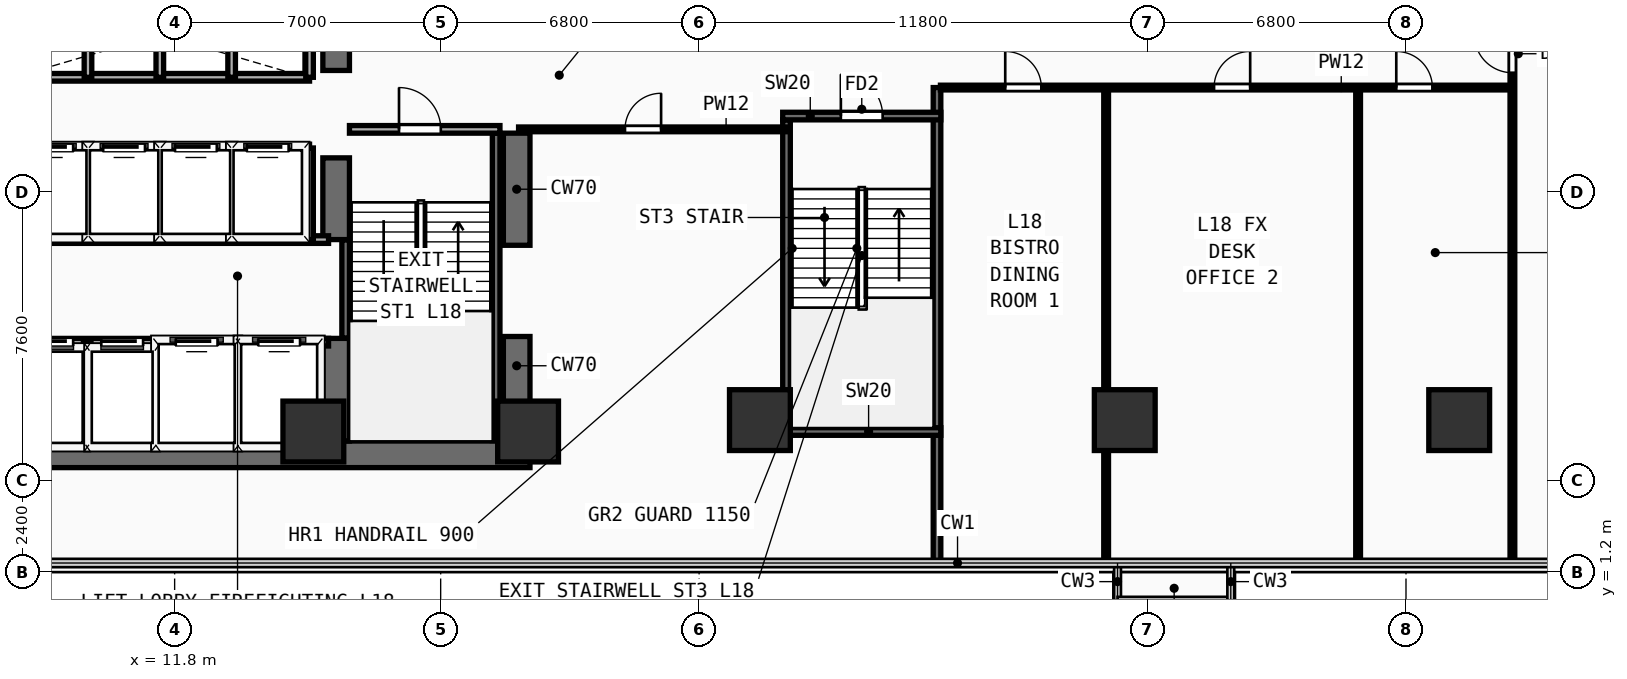
"""IFC4 building model, lengths in metres.
Left out: names, types, materials, properties, quantities, classifications, styles, units other than length and angle.
Written with IfcOpenShell. Run it as: python <this file> out.ifc"""

import sys

from ifc_helpers import new_model, si_unit, direction, frame, frame_2d, origin, origin_2d, place, context, subcontext, project, spatial, rectangle, extrude, element, fill, save


model = new_model("IFC4")
c1 = context("Model", 3, precision=1e-05, world=origin(), true_north=direction((0.0, 1.0)))
c2 = subcontext(c1, "Body", "Model", "MODEL_VIEW")
j1 = project(units=[si_unit("LENGTHUNIT", "METRE"), si_unit("PLANEANGLEUNIT", "RADIAN")], contexts=[c1])
p1 = place(None, origin())
s1 = spatial("IfcSite", under=j1, at=p1, CompositionType="ELEMENT")
p2 = place(p1, origin())
s2 = spatial("IfcBuilding", under=s1, at=p2, CompositionType="ELEMENT")
p3 = place(p2, frame((0.0, 0.0, 71.4)))
s3 = spatial("IfcBuildingStorey", under=s2, at=p3, CompositionType="ELEMENT", Elevation=71.4)
p4 = place(p3, frame((7.1, 4.3, 0.0), z_axis=(0.0, 0.0, 1.0), x_axis=(1.0, 0.0, 0.0)))
e1 = element("IfcWall", 1, at=p4, inside=s3, PredefinedType="SHEAR", context=c2, shape_type="SweptSolid", body=[
    extrude(rectangle(XDim=14.05, YDim=0.7, at=frame_2d((7.025, 0.0))), origin(), (0.0, 0.0, 1.0), 3.54),
])
p5 = place(p3, frame((20.8, 4.65, 0.0), z_axis=(0.0, 0.0, 1.0), x_axis=(0.0, 1.0, 0.0)))
e2 = element("IfcWall", 2, at=p5, inside=s3, PredefinedType="SHEAR", context=c2, shape_type="SweptSolid", body=[
    extrude(rectangle(XDim=2.75, YDim=0.7, at=frame_2d((1.375, 0.0))), origin(), (0.0, 0.0, 1.0), 3.54),
])
p6 = place(p3, frame((20.8, 9.8, 0.0), z_axis=(0.0, 0.0, 1.0), x_axis=(0.0, 1.0, 0.0)))
e3 = element("IfcWall", 3, at=p6, inside=s3, PredefinedType="SHEAR", context=c2, shape_type="SweptSolid", body=[
    extrude(rectangle(XDim=2.95, YDim=0.7, at=frame_2d((1.475, 0.0))), origin(), (0.0, 0.0, 1.0), 3.54),
])
p7 = place(p3, frame((16.05, 4.65, 0.0), z_axis=(0.0, 0.0, 1.0), x_axis=(0.0, 1.0, 0.0)))
e4 = element("IfcWall", 4, at=p7, inside=s3, PredefinedType="SHEAR", context=c2, shape_type="SweptSolid", body=[
    extrude(rectangle(XDim=2.7, YDim=0.7, at=frame_2d((1.35, 0.0))), origin(), (0.0, 0.0, 1.0), 3.54),
])
p8 = place(p3, frame((16.05, 9.95, 0.0), z_axis=(0.0, 0.0, 1.0), x_axis=(0.0, 1.0, 0.0)))
e5 = element("IfcWall", 5, at=p8, inside=s3, PredefinedType="SHEAR", context=c2, shape_type="SweptSolid", body=[
    extrude(rectangle(XDim=2.15, YDim=0.7, at=frame_2d((1.075, 0.0))), origin(), (0.0, 0.0, 1.0), 3.54),
])
p9 = place(p3, frame((16.05, 14.4, 0.0), z_axis=(0.0, 0.0, 1.0), x_axis=(0.0, 1.0, 0.0)))
e6 = element("IfcWall", 6, at=p9, inside=s3, PredefinedType="SHEAR", context=c2, shape_type="SweptSolid", body=[
    extrude(rectangle(XDim=9.1, YDim=0.7, at=frame_2d((4.55, 0.0))), origin(), (0.0, 0.0, 1.0), 3.54),
])
for number, where, z_axis, x_axis in (
    (7, (15.45, 4.9, 0.0), (0.0, 0.0, 1.0), (1.0, 0.0, 0.0)),
    (8, (21.1, 4.9, 0.0), (0.0, 0.0, 1.0), (1.0, 0.0, 0.0)),
    (9, (27.2, 5.2, 0.0), (0.0, 0.0, 1.0), (1.0, 0.0, 0.0)),
    (10, (36.8, 5.2, 0.0), (0.0, 0.0, 1.0), (1.0, 0.0, 0.0)),
    (11, (45.6, 5.2, 0.0), (0.0, 0.0, 1.0), (1.0, 0.0, 0.0)),
):
    element("IfcColumn", number, at=place(p3, frame(where, z_axis=z_axis, x_axis=x_axis)), inside=s3, PredefinedType="COLUMN", context=c2, shape_type="SweptSolid", body=[
        extrude(rectangle(XDim=1.6, YDim=1.6, at=origin_2d()), origin(), (0.0, 0.0, 1.0), 3.54),
    ])
p10 = place(p3, frame((16.3, 7.36, 0.0), z_axis=(0.0, 0.0, 1.0), x_axis=(0.0, 1.0, 0.0)))
e12 = element("IfcWall", 12, at=p10, inside=s3, PredefinedType="SHEAR", context=c2, shape_type="SweptSolid", body=[
    extrude(rectangle(XDim=2.58, YDim=0.2, at=frame_2d((1.29, 0.0))), origin(), (0.0, 0.0, 1.0), 3.54),
])
p11 = place(p3, frame((20.26, 4.66, 0.0), z_axis=(0.0, 0.0, 1.0), x_axis=(0.0, 1.0, 0.0)))
e13 = element("IfcWall", 13, at=p11, inside=s3, PredefinedType="SHEAR", context=c2, shape_type="SweptSolid", body=[
    extrude(rectangle(XDim=8.09, YDim=0.2, at=frame_2d((4.045, 0.0))), origin(), (0.0, 0.0, 1.0), 3.54),
])
p12 = place(p3, frame((16.4, 12.85, 0.0), z_axis=(0.0, 0.0, 1.0), x_axis=(1.0, 0.0, 0.0)))
e14 = element("IfcWall", 14, at=p12, inside=s3, PredefinedType="PARTITIONING", context=c2, shape_type="SweptSolid", body=[
    extrude(rectangle(XDim=3.96, YDim=0.2, at=frame_2d((1.98, 0.0))), origin(), (0.0, 0.0, 1.0), 3.54),
])
p13 = place(p12, frame((1.304, 0.0, 0.0)))
e15 = element("IfcOpeningElement", 15, at=p13, cuts=e14, PredefinedType="OPENING", context=c2, shape_type="SweptSolid", body=[
    extrude(rectangle(XDim=1.1, YDim=2.2, at=frame_2d((0.55, 1.1))), frame((0.0, 0.11, 0.0), z_axis=(0.0, -1.0, 0.0), x_axis=(1.0, 0.0, 0.0)), (0.0, 0.0, 1.0), 0.22),
])
p14 = place(p3, frame((27.9, 5.0, 0.0), z_axis=(0.0, 0.0, 1.0), x_axis=(0.0, 1.0, 0.0)))
e16 = element("IfcWall", 16, at=p14, inside=s3, PredefinedType="SHEAR", context=c2, shape_type="SweptSolid", body=[
    extrude(rectangle(XDim=8.1, YDim=0.2, at=frame_2d((4.05, 0.0))), origin(), (0.0, 0.0, 1.0), 3.54),
])
p15 = place(p3, frame((31.86, 1.44, 0.0), z_axis=(0.0, 0.0, 1.0), x_axis=(0.0, 1.0, 0.0)))
e17 = element("IfcWall", 17, at=p15, inside=s3, PredefinedType="SHEAR", context=c2, shape_type="SweptSolid", body=[
    extrude(rectangle(XDim=12.51, YDim=0.2, at=frame_2d((6.255, 0.0))), origin(), (0.0, 0.0, 1.0), 3.54),
])
p16 = place(p3, frame((27.8, 4.9, 0.0), z_axis=(0.0, 0.0, 1.0), x_axis=(1.0, 0.0, 0.0)))
e18 = element("IfcWall", 18, at=p16, inside=s3, PredefinedType="SHEAR", context=c2, shape_type="SweptSolid", body=[
    extrude(rectangle(XDim=4.16, YDim=0.2, at=frame_2d((2.08, 0.0))), origin(), (0.0, 0.0, 1.0), 3.54),
])
p17 = place(p3, frame((27.8, 13.2, 0.0), z_axis=(0.0, 0.0, 1.0), x_axis=(1.0, 0.0, 0.0)))
e19 = element("IfcWall", 19, at=p17, inside=s3, PredefinedType="SHEAR", context=c2, shape_type="SweptSolid", body=[
    extrude(rectangle(XDim=4.16, YDim=0.2, at=frame_2d((2.08, 0.0))), origin(), (0.0, 0.0, 1.0), 3.54),
])
p18 = place(p17, frame((1.53, 0.0, 0.0)))
e20 = element("IfcOpeningElement", 20, at=p18, cuts=e19, PredefinedType="OPENING", context=c2, shape_type="SweptSolid", body=[
    extrude(rectangle(XDim=1.1, YDim=2.2, at=frame_2d((0.55, 1.1))), frame((0.0, 0.11, 0.0), z_axis=(0.0, -1.0, 0.0), x_axis=(1.0, 0.0, 0.0)), (0.0, 0.0, 1.0), 0.22),
])
p19 = place(p3, frame((7.5, 7.25, 0.0), z_axis=(0.0, 0.0, 1.0), x_axis=(1.0, 0.0, 0.0)))
e21 = element("IfcWall", 21, at=p19, inside=s3, PredefinedType="PARTITIONING", context=c2, shape_type="SweptSolid", body=[
    extrude(rectangle(XDim=8.35, YDim=0.2, at=frame_2d((4.175, 0.0))), origin(), (0.0, 0.0, 1.0), 3.54),
])
p20 = place(p19, frame((0.53, 0.0, 0.0)))
e22 = element("IfcOpeningElement", 22, at=p20, cuts=e21, PredefinedType="OPENING", context=c2, shape_type="SweptSolid", body=[
    extrude(rectangle(XDim=1.1, YDim=2.2, at=frame_2d((0.55, 1.1))), frame((0.0, 0.11, 0.0), z_axis=(0.0, -1.0, 0.0), x_axis=(1.0, 0.0, 0.0)), (0.0, 0.0, 1.0), 0.22),
])
p21 = place(p19, frame((2.37, 0.0, 0.0)))
e23 = element("IfcOpeningElement", 23, at=p21, cuts=e21, PredefinedType="OPENING", context=c2, shape_type="SweptSolid", body=[
    extrude(rectangle(XDim=1.1, YDim=2.2, at=frame_2d((0.55, 1.1))), frame((0.0, 0.11, 0.0), z_axis=(0.0, -1.0, 0.0), x_axis=(1.0, 0.0, 0.0)), (0.0, 0.0, 1.0), 0.22),
])
p22 = place(p19, frame((4.33, 0.0, 0.0)))
e24 = element("IfcOpeningElement", 24, at=p22, cuts=e21, PredefinedType="OPENING", context=c2, shape_type="SweptSolid", body=[
    extrude(rectangle(XDim=1.1, YDim=2.2, at=frame_2d((0.55, 1.1))), frame((0.0, 0.11, 0.0), z_axis=(0.0, -1.0, 0.0), x_axis=(1.0, 0.0, 0.0)), (0.0, 0.0, 1.0), 0.22),
])
p23 = place(p19, frame((6.5, 0.0, 0.0)))
e25 = element("IfcOpeningElement", 25, at=p23, cuts=e21, PredefinedType="OPENING", context=c2, shape_type="SweptSolid", body=[
    extrude(rectangle(XDim=1.1, YDim=2.2, at=frame_2d((0.55, 1.1))), frame((0.0, 0.11, 0.0), z_axis=(0.0, -1.0, 0.0), x_axis=(1.0, 0.0, 0.0)), (0.0, 0.0, 1.0), 0.22),
])
p24 = place(p3, frame((7.5, 9.95, 0.0), z_axis=(0.0, 0.0, 1.0), x_axis=(1.0, 0.0, 0.0)))
e26 = element("IfcWall", 26, at=p24, inside=s3, PredefinedType="PARTITIONING", context=c2, shape_type="SweptSolid", body=[
    extrude(rectangle(XDim=8.35, YDim=0.2, at=frame_2d((4.175, 0.0))), origin(), (0.0, 0.0, 1.0), 3.54),
])
for number, where, z_axis, x_axis in (
    (27, (9.5, 4.45, 0.0), (0.0, 0.0, 1.0), (0.0, 1.0, 0.0)),
    (28, (11.36, 4.45, 0.0), (0.0, 0.0, 1.0), (0.0, 1.0, 0.0)),
    (29, (13.46, 4.45, 0.0), (0.0, 0.0, 1.0), (0.0, 1.0, 0.0)),
):
    element("IfcWall", number, at=place(p3, frame(where, z_axis=z_axis, x_axis=x_axis)), inside=s3, PredefinedType="PARTITIONING", context=c2, shape_type="SweptSolid", body=[
        extrude(rectangle(XDim=2.8, YDim=0.2, at=frame_2d((1.4, 0.0))), origin(), (0.0, 0.0, 1.0), 3.54),
    ])
p25 = place(p3, frame((7.5, 12.36, 0.0), z_axis=(0.0, 0.0, 1.0), x_axis=(1.0, 0.0, 0.0)))
e30 = element("IfcWall", 30, at=p25, inside=s3, PredefinedType="PARTITIONING", context=c2, shape_type="SweptSolid", body=[
    extrude(rectangle(XDim=7.85, YDim=0.2, at=frame_2d((3.925, 0.0))), origin(), (0.0, 0.0, 1.0), 3.54),
])
p26 = place(p25, frame((0.53, 0.0, 0.0)))
e31 = element("IfcOpeningElement", 31, at=p26, cuts=e30, PredefinedType="OPENING", context=c2, shape_type="SweptSolid", body=[
    extrude(rectangle(XDim=1.1, YDim=2.2, at=frame_2d((0.55, 1.1))), frame((0.0, 0.11, 0.0), z_axis=(0.0, -1.0, 0.0), x_axis=(1.0, 0.0, 0.0)), (0.0, 0.0, 1.0), 0.22),
])
p27 = place(p25, frame((2.42, 0.0, 0.0)))
e32 = element("IfcOpeningElement", 32, at=p27, cuts=e30, PredefinedType="OPENING", context=c2, shape_type="SweptSolid", body=[
    extrude(rectangle(XDim=1.1, YDim=2.2, at=frame_2d((0.55, 1.1))), frame((0.0, 0.11, 0.0), z_axis=(0.0, -1.0, 0.0), x_axis=(1.0, 0.0, 0.0)), (0.0, 0.0, 1.0), 0.22),
])
p28 = place(p25, frame((4.31, 0.0, 0.0)))
e33 = element("IfcOpeningElement", 33, at=p28, cuts=e30, PredefinedType="OPENING", context=c2, shape_type="SweptSolid", body=[
    extrude(rectangle(XDim=1.1, YDim=2.2, at=frame_2d((0.55, 1.1))), frame((0.0, 0.11, 0.0), z_axis=(0.0, -1.0, 0.0), x_axis=(1.0, 0.0, 0.0)), (0.0, 0.0, 1.0), 0.22),
])
p29 = place(p25, frame((6.2, 0.0, 0.0)))
e34 = element("IfcOpeningElement", 34, at=p29, cuts=e30, PredefinedType="OPENING", context=c2, shape_type="SweptSolid", body=[
    extrude(rectangle(XDim=1.1, YDim=2.2, at=frame_2d((0.55, 1.1))), frame((0.0, 0.11, 0.0), z_axis=(0.0, -1.0, 0.0), x_axis=(1.0, 0.0, 0.0)), (0.0, 0.0, 1.0), 0.22),
])
for number, where, z_axis, x_axis in (
    (35, (15.35, 9.95, 0.0), (0.0, 0.0, 1.0), (0.0, 1.0, 0.0)),
    (36, (9.52, 9.95, 0.0), (0.0, 0.0, 1.0), (0.0, 1.0, 0.0)),
    (37, (11.41, 9.95, 0.0), (0.0, 0.0, 1.0), (0.0, 1.0, 0.0)),
    (38, (13.3, 9.95, 0.0), (0.0, 0.0, 1.0), (0.0, 1.0, 0.0)),
):
    element("IfcWall", number, at=place(p3, frame(where, z_axis=z_axis, x_axis=x_axis)), inside=s3, PredefinedType="PARTITIONING", context=c2, shape_type="SweptSolid", body=[
        extrude(rectangle(XDim=2.41, YDim=0.2, at=frame_2d((1.205, 0.0))), origin(), (0.0, 0.0, 1.0), 3.54),
    ])
p30 = place(p3, frame((7.5, 14.22, 0.0), z_axis=(0.0, 0.0, 1.0), x_axis=(1.0, 0.0, 0.0)))
e39 = element("IfcWall", 39, at=p30, inside=s3, PredefinedType="PARTITIONING", context=c2, shape_type="SweptSolid", body=[
    extrude(rectangle(XDim=7.85, YDim=0.2, at=frame_2d((3.925, 0.0))), origin(), (0.0, 0.0, 1.0), 3.54),
])
for number, where, z_axis, x_axis in (
    (40, (15.35, 14.22, 0.0), (0.0, 0.0, 1.0), (0.0, 1.0, 0.0)),
    (41, (9.52, 14.22, 0.0), (0.0, 0.0, 1.0), (0.0, 1.0, 0.0)),
    (42, (11.41, 14.22, 0.0), (0.0, 0.0, 1.0), (0.0, 1.0, 0.0)),
    (43, (13.3, 14.22, 0.0), (0.0, 0.0, 1.0), (0.0, 1.0, 0.0)),
):
    element("IfcWall", number, at=place(p3, frame(where, z_axis=z_axis, x_axis=x_axis)), inside=s3, PredefinedType="PARTITIONING", context=c2, shape_type="SweptSolid", body=[
        extrude(rectangle(XDim=2.23, YDim=0.2, at=frame_2d((1.115, 0.0))), origin(), (0.0, 0.0, 1.0), 3.54),
    ])
p31 = place(p3, frame((20.85, 12.85, 0.0), z_axis=(0.0, 0.0, 1.0), x_axis=(1.0, 0.0, 0.0)))
e44 = element("IfcWall", 44, at=p31, inside=s3, PredefinedType="PARTITIONING", context=c2, shape_type="SweptSolid", body=[
    extrude(rectangle(XDim=7.05, YDim=0.125, at=frame_2d((3.525, 0.0))), origin(), (0.0, 0.0, 1.0), 3.54),
])
p32 = place(p31, frame((2.8, 0.0, 0.0)))
e45 = element("IfcOpeningElement", 45, at=p32, cuts=e44, PredefinedType="OPENING", context=c2, shape_type="SweptSolid", body=[
    extrude(rectangle(XDim=0.95, YDim=2.15, at=frame_2d((0.475, 1.075))), frame((0.0, 0.073, 0.0), z_axis=(0.0, -1.0, 0.0), x_axis=(1.0, 0.0, 0.0)), (0.0, 0.0, 1.0), 0.145),
])
p33 = place(p3, frame((31.95, 13.95, 0.0), z_axis=(0.0, 0.0, 1.0), x_axis=(1.0, 0.0, 0.0)))
e46 = element("IfcWall", 46, at=p33, inside=s3, PredefinedType="PARTITIONING", context=c2, shape_type="SweptSolid", body=[
    extrude(rectangle(XDim=15.05, YDim=0.125, at=frame_2d((7.525, 0.0))), origin(), (0.0, 0.0, 1.0), 3.54),
])
p34 = place(p33, frame((1.705, 0.0, 0.0)))
e47 = element("IfcOpeningElement", 47, at=p34, cuts=e46, PredefinedType="OPENING", context=c2, shape_type="SweptSolid", body=[
    extrude(rectangle(XDim=0.95, YDim=2.15, at=frame_2d((0.475, 1.075))), frame((0.0, 0.073, 0.0), z_axis=(0.0, -1.0, 0.0), x_axis=(1.0, 0.0, 0.0)), (0.0, 0.0, 1.0), 0.145),
])
p35 = place(p33, frame((7.2, 0.0, 0.0)))
e48 = element("IfcOpeningElement", 48, at=p35, cuts=e46, PredefinedType="OPENING", context=c2, shape_type="SweptSolid", body=[
    extrude(rectangle(XDim=0.95, YDim=2.15, at=frame_2d((0.475, 1.075))), frame((0.0, 0.073, 0.0), z_axis=(0.0, -1.0, 0.0), x_axis=(1.0, 0.0, 0.0)), (0.0, 0.0, 1.0), 0.145),
])
p36 = place(p33, frame((11.994, 0.0, 0.0)))
e49 = element("IfcOpeningElement", 49, at=p36, cuts=e46, PredefinedType="OPENING", context=c2, shape_type="SweptSolid", body=[
    extrude(rectangle(XDim=0.95, YDim=2.15, at=frame_2d((0.475, 1.075))), frame((0.0, 0.073, 0.0), z_axis=(0.0, -1.0, 0.0), x_axis=(1.0, 0.0, 0.0)), (0.0, 0.0, 1.0), 0.145),
])
for number, where, z_axis, x_axis in (
    (50, (36.31, 1.44, 0.0), (0.0, 0.0, 1.0), (0.0, 1.0, 0.0)),
    (51, (42.94, 1.44, 0.0), (0.0, 0.0, 1.0), (0.0, 1.0, 0.0)),
):
    element("IfcWall", number, at=place(p3, frame(where, z_axis=z_axis, x_axis=x_axis)), inside=s3, PredefinedType="PARTITIONING", context=c2, shape_type="SweptSolid", body=[
        extrude(rectangle(XDim=12.51, YDim=0.125, at=frame_2d((6.255, 0.0))), origin(), (0.0, 0.0, 1.0), 3.54),
    ])
p37 = place(p3, frame((47.0, 1.44, 0.0), z_axis=(0.0, 0.0, 1.0), x_axis=(0.0, 1.0, 0.0)))
e52 = element("IfcWall", 52, at=p37, inside=s3, PredefinedType="PARTITIONING", context=c2, shape_type="SweptSolid", body=[
    extrude(rectangle(XDim=22.12, YDim=0.125, at=frame_2d((11.06, 0.0))), origin(), (0.0, 0.0, 1.0), 3.54),
])
p38 = place(p37, frame((12.9, 0.0, 0.0)))
e53 = element("IfcOpeningElement", 53, at=p38, cuts=e52, PredefinedType="OPENING", context=c2, shape_type="SweptSolid", body=[
    extrude(rectangle(XDim=1.0, YDim=2.2, at=frame_2d((0.5, 1.1))), frame((0.0, 0.073, 0.0), z_axis=(0.0, -1.0, 0.0), x_axis=(1.0, 0.0, 0.0)), (0.0, 0.0, 1.0), 0.145),
])
p39 = place(p13, frame((1.1, 0.0, 0.0), z_axis=(0.0, 0.0, 1.0), x_axis=(-1.0, 0.0, 0.0)))
e54 = element("IfcDoor", 54, at=p39, inside=s3, OperationType="SINGLE_SWING_RIGHT", PredefinedType="DOOR", context=c2, shape_type="SweptSolid", body=[
    extrude(rectangle(XDim=1.1, YDim=2.2, at=frame_2d((0.55, 1.1))), frame((0.0, 0.025, 0.0), z_axis=(0.0, -1.0, 0.0), x_axis=(1.0, 0.0, 0.0)), (0.0, 0.0, 1.0), 0.05),
])
fill(e15, e54)
p40 = place(p18, frame((1.1, 0.0, 0.0), z_axis=(0.0, 0.0, 1.0), x_axis=(-1.0, 0.0, 0.0)))
e55 = element("IfcDoor", 55, at=p40, inside=s3, OperationType="SINGLE_SWING_RIGHT", PredefinedType="DOOR", context=c2, shape_type="SweptSolid", body=[
    extrude(rectangle(XDim=1.1, YDim=2.2, at=frame_2d((0.55, 1.1))), frame((0.0, 0.025, 0.0), z_axis=(0.0, -1.0, 0.0), x_axis=(1.0, 0.0, 0.0)), (0.0, 0.0, 1.0), 0.05),
])
fill(e20, e55)
p41 = place(p20, origin())
e56 = element("IfcDoor", 56, at=p41, inside=s3, OperationType="SLIDING_TO_LEFT", PredefinedType="DOOR", context=c2, shape_type="SweptSolid", body=[
    extrude(rectangle(XDim=1.1, YDim=2.2, at=frame_2d((0.55, 1.1))), frame((0.0, 0.025, 0.0), z_axis=(0.0, -1.0, 0.0), x_axis=(1.0, 0.0, 0.0)), (0.0, 0.0, 1.0), 0.05),
])
fill(e22, e56)
p42 = place(p21, origin())
e57 = element("IfcDoor", 57, at=p42, inside=s3, OperationType="SLIDING_TO_LEFT", PredefinedType="DOOR", context=c2, shape_type="SweptSolid", body=[
    extrude(rectangle(XDim=1.1, YDim=2.2, at=frame_2d((0.55, 1.1))), frame((0.0, 0.025, 0.0), z_axis=(0.0, -1.0, 0.0), x_axis=(1.0, 0.0, 0.0)), (0.0, 0.0, 1.0), 0.05),
])
fill(e23, e57)
p43 = place(p22, origin())
e58 = element("IfcDoor", 58, at=p43, inside=s3, OperationType="SLIDING_TO_LEFT", PredefinedType="DOOR", context=c2, shape_type="SweptSolid", body=[
    extrude(rectangle(XDim=1.1, YDim=2.2, at=frame_2d((0.55, 1.1))), frame((0.0, 0.025, 0.0), z_axis=(0.0, -1.0, 0.0), x_axis=(1.0, 0.0, 0.0)), (0.0, 0.0, 1.0), 0.05),
])
fill(e24, e58)
p44 = place(p23, origin())
e59 = element("IfcDoor", 59, at=p44, inside=s3, OperationType="SLIDING_TO_LEFT", PredefinedType="DOOR", context=c2, shape_type="SweptSolid", body=[
    extrude(rectangle(XDim=1.1, YDim=2.2, at=frame_2d((0.55, 1.1))), frame((0.0, 0.025, 0.0), z_axis=(0.0, -1.0, 0.0), x_axis=(1.0, 0.0, 0.0)), (0.0, 0.0, 1.0), 0.05),
])
fill(e25, e59)
p45 = place(p26, origin())
e60 = element("IfcDoor", 60, at=p45, inside=s3, OperationType="SLIDING_TO_LEFT", PredefinedType="DOOR", context=c2, shape_type="SweptSolid", body=[
    extrude(rectangle(XDim=1.1, YDim=2.2, at=frame_2d((0.55, 1.1))), frame((0.0, 0.025, 0.0), z_axis=(0.0, -1.0, 0.0), x_axis=(1.0, 0.0, 0.0)), (0.0, 0.0, 1.0), 0.05),
])
fill(e31, e60)
p46 = place(p27, origin())
e61 = element("IfcDoor", 61, at=p46, inside=s3, OperationType="SLIDING_TO_LEFT", PredefinedType="DOOR", context=c2, shape_type="SweptSolid", body=[
    extrude(rectangle(XDim=1.1, YDim=2.2, at=frame_2d((0.55, 1.1))), frame((0.0, 0.025, 0.0), z_axis=(0.0, -1.0, 0.0), x_axis=(1.0, 0.0, 0.0)), (0.0, 0.0, 1.0), 0.05),
])
fill(e32, e61)
p47 = place(p28, origin())
e62 = element("IfcDoor", 62, at=p47, inside=s3, OperationType="SLIDING_TO_LEFT", PredefinedType="DOOR", context=c2, shape_type="SweptSolid", body=[
    extrude(rectangle(XDim=1.1, YDim=2.2, at=frame_2d((0.55, 1.1))), frame((0.0, 0.025, 0.0), z_axis=(0.0, -1.0, 0.0), x_axis=(1.0, 0.0, 0.0)), (0.0, 0.0, 1.0), 0.05),
])
fill(e33, e62)
p48 = place(p29, origin())
e63 = element("IfcDoor", 63, at=p48, inside=s3, OperationType="SLIDING_TO_LEFT", PredefinedType="DOOR", context=c2, shape_type="SweptSolid", body=[
    extrude(rectangle(XDim=1.1, YDim=2.2, at=frame_2d((0.55, 1.1))), frame((0.0, 0.025, 0.0), z_axis=(0.0, -1.0, 0.0), x_axis=(1.0, 0.0, 0.0)), (0.0, 0.0, 1.0), 0.05),
])
fill(e34, e63)
p49 = place(p32, origin())
e64 = element("IfcDoor", 64, at=p49, inside=s3, OperationType="SINGLE_SWING_RIGHT", PredefinedType="DOOR", context=c2, shape_type="SweptSolid", body=[
    extrude(rectangle(XDim=0.95, YDim=2.15, at=frame_2d((0.475, 1.075))), frame((0.0, 0.025, 0.0), z_axis=(0.0, -1.0, 0.0), x_axis=(1.0, 0.0, 0.0)), (0.0, 0.0, 1.0), 0.05),
])
fill(e45, e64)
p50 = place(p34, origin())
e65 = element("IfcDoor", 65, at=p50, inside=s3, OperationType="SINGLE_SWING_LEFT", PredefinedType="DOOR", context=c2, shape_type="SweptSolid", body=[
    extrude(rectangle(XDim=0.95, YDim=2.15, at=frame_2d((0.475, 1.075))), frame((0.0, 0.025, 0.0), z_axis=(0.0, -1.0, 0.0), x_axis=(1.0, 0.0, 0.0)), (0.0, 0.0, 1.0), 0.05),
])
fill(e47, e65)
p51 = place(p35, origin())
e66 = element("IfcDoor", 66, at=p51, inside=s3, OperationType="SINGLE_SWING_RIGHT", PredefinedType="DOOR", context=c2, shape_type="SweptSolid", body=[
    extrude(rectangle(XDim=0.95, YDim=2.15, at=frame_2d((0.475, 1.075))), frame((0.0, 0.025, 0.0), z_axis=(0.0, -1.0, 0.0), x_axis=(1.0, 0.0, 0.0)), (0.0, 0.0, 1.0), 0.05),
])
fill(e48, e66)
p52 = place(p36, origin())
e67 = element("IfcDoor", 67, at=p52, inside=s3, OperationType="SINGLE_SWING_LEFT", PredefinedType="DOOR", context=c2, shape_type="SweptSolid", body=[
    extrude(rectangle(XDim=0.95, YDim=2.15, at=frame_2d((0.475, 1.075))), frame((0.0, 0.025, 0.0), z_axis=(0.0, -1.0, 0.0), x_axis=(1.0, 0.0, 0.0)), (0.0, 0.0, 1.0), 0.05),
])
fill(e49, e67)
p53 = place(p38, origin())
e68 = element("IfcDoor", 68, at=p53, inside=s3, OperationType="SINGLE_SWING_RIGHT", PredefinedType="DOOR", context=c2, shape_type="SweptSolid", body=[
    extrude(rectangle(XDim=1.0, YDim=2.2, at=frame_2d((0.5, 1.1))), frame((0.0, 0.025, 0.0), z_axis=(0.0, -1.0, 0.0), x_axis=(1.0, 0.0, 0.0)), (0.0, 0.0, 1.0), 0.05),
])
fill(e53, e68)
save(model, sys.argv[1])
